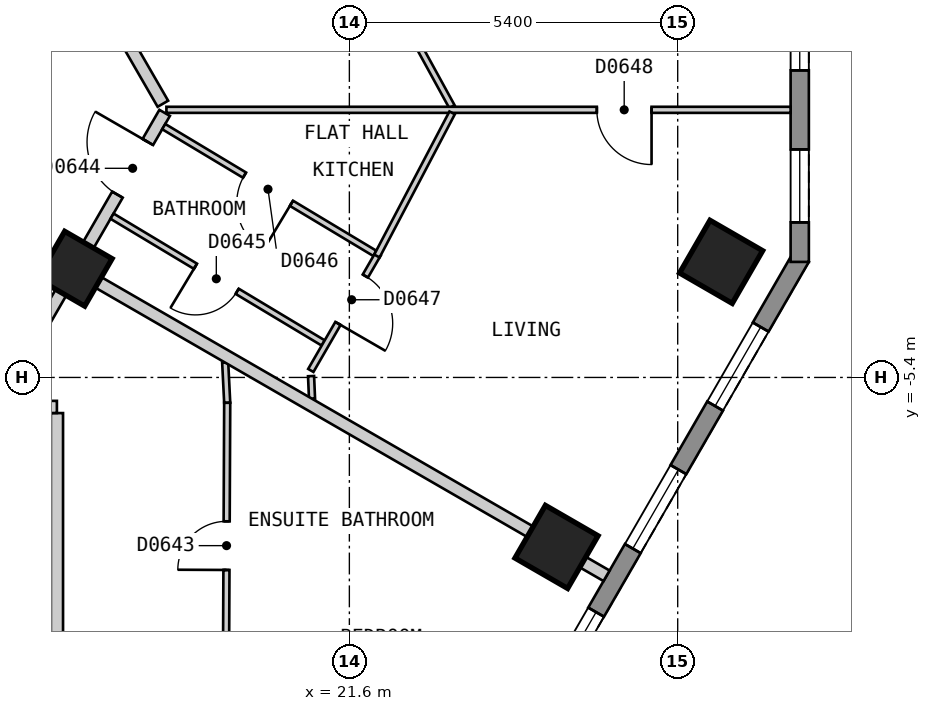
"""IFC4 building model, lengths in metres.
Left out: names, types, materials, properties, quantities, classifications, styles, units other than length and angle.
Written with IfcOpenShell. Run it as: python <this file> out.ifc"""

import sys

from ifc_helpers import new_model, si_unit, direction, frame, frame_2d, origin, origin_2d, place, context, subcontext, project, spatial, polyline, rectangle, outline, extrude, element, fill, save


model = new_model("IFC4")
c1 = context("Model", 3, precision=1e-05, world=origin(), true_north=direction((0.0, 1.0)))
c2 = subcontext(c1, "Body", "Model", "MODEL_VIEW")
j1 = project(units=[si_unit("LENGTHUNIT", "METRE"), si_unit("PLANEANGLEUNIT", "RADIAN")], contexts=[c1])
p1 = place(None, origin())
s1 = spatial("IfcSite", under=j1, at=p1, CompositionType="ELEMENT")
p2 = place(p1, origin())
s2 = spatial("IfcBuilding", under=s1, at=p2, CompositionType="ELEMENT")
p3 = place(p2, frame((0.0, 0.0, 81.0)))
s3 = spatial("IfcBuildingStorey", under=s2, at=p3, CompositionType="ELEMENT", Elevation=81.0)
for number, where, z_axis, x_axis in (
    (1, (25.007, -8.187, 0.0), (0.0, 0.0, 1.0), (0.5, 0.866, 0.0)),
    (2, (27.714, -3.499, 0.0), (0.0, 0.0, 1.0), (0.5, 0.866, 0.0)),
):
    element("IfcColumn", number, at=place(p3, frame(where, z_axis=z_axis, x_axis=x_axis)), inside=s3, PredefinedType="COLUMN", context=c2, shape_type="SweptSolid", body=[
        extrude(rectangle(XDim=1.0, YDim=1.0, at=origin_2d()), origin(), (0.0, 0.0, 1.0), 3.0),
    ])
p4 = place(p3, frame((17.083, -3.612, 0.0), z_axis=(0.0, 0.0, 1.0), x_axis=(0.5, 0.866025403784, 0.0)))
e3 = element("IfcColumn", 3, at=p4, inside=s3, PredefinedType="COLUMN", context=c2, shape_type="SweptSolid", body=[
    extrude(rectangle(XDim=0.9, YDim=0.9, at=origin_2d()), origin(), (0.0, 0.0, 1.0), 3.0),
])
p5 = place(p3, frame((17.479, -23.425, 0.0), z_axis=(0.0, 0.0, 1.0), x_axis=(0.500035407905, 0.866004960056, 0.0)))
e4 = element("IfcWall", 4, at=p5, inside=s3, PredefinedType="SOLIDWALL", context=c2, shape_type="SweptSolid", body=[
    extrude(outline(polyline([(0.0, -0.15), (23.094, -0.15), (23.014, 0.15), (0.08, 0.15), (0.0, -0.15)])), origin(), (0.0, 0.0, 1.0), 2.7),
])
p6 = place(p5, frame((1.324, 0.0, 0.15)))
e5 = element("IfcOpeningElement", 5, at=p6, cuts=e4, PredefinedType="OPENING", context=c2, shape_type="SweptSolid", body=[
    extrude(rectangle(XDim=1.5, YDim=2.1, at=frame_2d((0.75, 1.05))), frame((0.0, 0.16, 0.0), z_axis=(0.0, -1.0, 0.0), x_axis=(1.0, 0.0, 0.0)), (0.0, 0.0, 1.0), 0.32),
])
p7 = place(p5, frame((4.031, 0.0, 0.15)))
e6 = element("IfcOpeningElement", 6, at=p7, cuts=e4, PredefinedType="OPENING", context=c2, shape_type="SweptSolid", body=[
    extrude(rectangle(XDim=1.5, YDim=2.1, at=frame_2d((0.75, 1.05))), frame((0.0, 0.16, 0.0), z_axis=(0.0, -1.0, 0.0), x_axis=(1.0, 0.0, 0.0)), (0.0, 0.0, 1.0), 0.32),
])
p8 = place(p5, frame((6.737, 0.0, 0.15)))
e7 = element("IfcOpeningElement", 7, at=p8, cuts=e4, PredefinedType="OPENING", context=c2, shape_type="SweptSolid", body=[
    extrude(rectangle(XDim=1.5, YDim=2.1, at=frame_2d((0.75, 1.05))), frame((0.0, 0.16, 0.0), z_axis=(0.0, -1.0, 0.0), x_axis=(1.0, 0.0, 0.0)), (0.0, 0.0, 1.0), 0.32),
])
p9 = place(p5, frame((9.444, 0.0, 0.15)))
e8 = element("IfcOpeningElement", 8, at=p9, cuts=e4, PredefinedType="OPENING", context=c2, shape_type="SweptSolid", body=[
    extrude(rectangle(XDim=1.5, YDim=2.1, at=frame_2d((0.75, 1.05))), frame((0.0, 0.16, 0.0), z_axis=(0.0, -1.0, 0.0), x_axis=(1.0, 0.0, 0.0)), (0.0, 0.0, 1.0), 0.32),
])
p10 = place(p5, frame((12.151, 0.0, 0.15)))
e9 = element("IfcOpeningElement", 9, at=p10, cuts=e4, PredefinedType="OPENING", context=c2, shape_type="SweptSolid", body=[
    extrude(rectangle(XDim=1.5, YDim=2.1, at=frame_2d((0.75, 1.05))), frame((0.0, 0.16, 0.0), z_axis=(0.0, -1.0, 0.0), x_axis=(1.0, 0.0, 0.0)), (0.0, 0.0, 1.0), 0.32),
])
p11 = place(p5, frame((14.857, 0.0, 0.15)))
e10 = element("IfcOpeningElement", 10, at=p11, cuts=e4, PredefinedType="OPENING", context=c2, shape_type="SweptSolid", body=[
    extrude(rectangle(XDim=1.5, YDim=2.1, at=frame_2d((0.75, 1.05))), frame((0.0, 0.16, 0.0), z_axis=(0.0, -1.0, 0.0), x_axis=(1.0, 0.0, 0.0)), (0.0, 0.0, 1.0), 0.32),
])
p12 = place(p5, frame((17.564, 0.0, 0.15)))
e11 = element("IfcOpeningElement", 11, at=p12, cuts=e4, PredefinedType="OPENING", context=c2, shape_type="SweptSolid", body=[
    extrude(rectangle(XDim=1.5, YDim=2.1, at=frame_2d((0.75, 1.05))), frame((0.0, 0.16, 0.0), z_axis=(0.0, -1.0, 0.0), x_axis=(1.0, 0.0, 0.0)), (0.0, 0.0, 1.0), 0.32),
])
p13 = place(p5, frame((20.271, 0.0, 0.15)))
e12 = element("IfcOpeningElement", 12, at=p13, cuts=e4, PredefinedType="OPENING", context=c2, shape_type="SweptSolid", body=[
    extrude(rectangle(XDim=1.5, YDim=2.1, at=frame_2d((0.75, 1.05))), frame((0.0, 0.16, 0.0), z_axis=(0.0, -1.0, 0.0), x_axis=(1.0, 0.0, 0.0)), (0.0, 0.0, 1.0), 0.32),
])
p14 = place(p3, frame((29.007, -3.5, 0.0), z_axis=(0.0, 0.0, 1.0), x_axis=(0.0, 1.0, 0.0)))
e13 = element("IfcWall", 13, at=p14, inside=s3, PredefinedType="SOLIDWALL", context=c2, shape_type="SweptSolid", body=[
    extrude(outline(polyline([(0.0, -0.15), (5.0, -0.15), (4.92, 0.15), (0.08, 0.15), (0.0, -0.15)])), origin(), (0.0, 0.0, 1.0), 2.7),
])
p15 = place(p14, frame((0.65, 0.0, 0.15)))
e14 = element("IfcOpeningElement", 14, at=p15, cuts=e13, PredefinedType="OPENING", context=c2, shape_type="SweptSolid", body=[
    extrude(rectangle(XDim=1.2, YDim=2.1, at=frame_2d((0.6, 1.05))), frame((0.0, 0.16, 0.0), z_axis=(0.0, -1.0, 0.0), x_axis=(1.0, 0.0, 0.0)), (0.0, 0.0, 1.0), 0.32),
])
p16 = place(p14, frame((3.15, 0.0, 0.15)))
e15 = element("IfcOpeningElement", 15, at=p16, cuts=e13, PredefinedType="OPENING", context=c2, shape_type="SweptSolid", body=[
    extrude(rectangle(XDim=1.2, YDim=2.1, at=frame_2d((0.6, 1.05))), frame((0.0, 0.16, 0.0), z_axis=(0.0, -1.0, 0.0), x_axis=(1.0, 0.0, 0.0)), (0.0, 0.0, 1.0), 0.32),
])
p17 = place(p3, frame((8.488, 16.5, 0.0), z_axis=(0.0, 0.0, 1.0), x_axis=(0.499986836607, -0.86603300354, 0.0)))
e16 = element("IfcWall", 16, at=p17, inside=s3, PredefinedType="PARTITIONING", context=c2, shape_type="SweptSolid", body=[
    extrude(rectangle(XDim=20.09, YDim=0.2, at=frame_2d((10.045, 0.0))), origin(), (0.0, 0.0, 1.0), 2.7),
])
p18 = place(p17, frame((14.569, 0.0, 0.0)))
e17 = element("IfcOpeningElement", 17, at=p18, cuts=e16, PredefinedType="OPENING", context=c2, shape_type="SweptSolid", body=[
    extrude(rectangle(XDim=1.0, YDim=2.1, at=frame_2d((0.5, 1.05))), frame((0.0, 0.11, 0.0), z_axis=(0.0, -1.0, 0.0), x_axis=(1.0, 0.0, 0.0)), (0.0, 0.0, 1.0), 0.22),
])
p19 = place(p3, frame((16.791, -5.986, 0.0), z_axis=(0.0, 0.0, 1.0), x_axis=(0.0, -1.0, 0.0)))
e18 = element("IfcWall", 18, at=p19, inside=s3, PredefinedType="PARTITIONING", context=c2, shape_type="SweptSolid", body=[
    extrude(rectangle(XDim=3.708, YDim=0.2, at=frame_2d((1.854, 0.0))), origin(), (0.0, 0.0, 1.0), 2.7),
])
p20 = place(p3, frame((15.887, -5.885, 0.0), z_axis=(0.0, 0.0, 1.0), x_axis=(1.0, 0.0, 0.0)))
e19 = element("IfcWall", 19, at=p20, inside=s3, PredefinedType="PARTITIONING", context=c2, shape_type="SweptSolid", body=[
    extrude(rectangle(XDim=0.903, YDim=0.2, at=frame_2d((0.452, 0.0))), origin(), (0.0, 0.0, 1.0), 2.7),
])
p21 = place(p3, frame((15.771, -5.884, 0.0), z_axis=(0.0, 0.0, 1.0), x_axis=(0.499939494019, 0.866060334111, 0.0)))
e20 = element("IfcWall", 20, at=p21, inside=s3, PredefinedType="PARTITIONING", context=c2, shape_type="SweptSolid", body=[
    extrude(rectangle(XDim=5.583, YDim=0.2, at=frame_2d((2.792, 0.0))), origin(), (0.0, 0.0, 1.0), 2.7),
])
p22 = place(p21, frame((4.03, 0.0, 0.0)))
e21 = element("IfcOpeningElement", 21, at=p22, cuts=e20, PredefinedType="OPENING", context=c2, shape_type="SweptSolid", body=[
    extrude(rectangle(XDim=1.0, YDim=2.1, at=frame_2d((0.5, 1.05))), frame((0.0, 0.11, 0.0), z_axis=(0.0, -1.0, 0.0), x_axis=(1.0, 0.0, 0.0)), (0.0, 0.0, 1.0), 0.22),
])
p23 = place(p3, frame((20.964, 3.287, 0.0), z_axis=(0.0, 0.0, 1.0), x_axis=(0.4810005962, -0.876720266936, 0.0)))
e22 = element("IfcWall", 22, at=p23, inside=s3, PredefinedType="PARTITIONING", context=c2, shape_type="SweptSolid", body=[
    extrude(rectangle(XDim=4.83, YDim=0.1, at=frame_2d((2.415, 0.0))), origin(), (0.0, 0.0, 1.0), 2.7),
])
p24 = place(p23, frame((1.995, 0.0, 0.0)))
e23 = element("IfcOpeningElement", 23, at=p24, cuts=e22, PredefinedType="OPENING", context=c2, shape_type="SweptSolid", body=[
    extrude(rectangle(XDim=0.8, YDim=2.1, at=frame_2d((0.4, 1.05))), frame((0.0, 0.06, 0.0), z_axis=(0.0, -1.0, 0.0), x_axis=(1.0, 0.0, 0.0)), (0.0, 0.0, 1.0), 0.12),
])
p25 = place(p3, frame((19.558, -5.156, 0.0), z_axis=(0.0, 0.0, 1.0), x_axis=(0.04980880462, -0.998758771167, 0.0)))
e24 = element("IfcWall", 24, at=p25, inside=s3, PredefinedType="PARTITIONING", context=c2, shape_type="SweptSolid", body=[
    extrude(rectangle(XDim=0.662, YDim=0.1, at=frame_2d((0.331, 0.0))), origin(), (0.0, 0.0, 1.0), 2.7),
])
p26 = place(p3, frame((20.97, -5.378, 0.0), z_axis=(0.0, 0.0, 1.0), x_axis=(0.043266532348, -0.999063565134, 0.0)))
e25 = element("IfcWall", 25, at=p26, inside=s3, PredefinedType="PARTITIONING", context=c2, shape_type="SweptSolid", body=[
    extrude(rectangle(XDim=0.372, YDim=0.1, at=frame_2d((0.186, 0.0))), origin(), (0.0, 0.0, 1.0), 2.7),
])
p27 = place(p3, frame((17.697, -2.748, 0.0), z_axis=(0.0, 0.0, 1.0), x_axis=(0.857359945576, -0.514717324093, 0.0)))
e26 = element("IfcWall", 26, at=p27, inside=s3, PredefinedType="PARTITIONING", context=c2, shape_type="SweptSolid", body=[
    extrude(rectangle(XDim=4.051, YDim=0.1, at=frame_2d((2.025, 0.0))), origin(), (0.0, 0.0, 1.0), 2.7),
])
p28 = place(p27, frame((1.6, 0.0, 0.0)))
e27 = element("IfcOpeningElement", 27, at=p28, cuts=e26, PredefinedType="OPENING", context=c2, shape_type="SweptSolid", body=[
    extrude(rectangle(XDim=0.8, YDim=2.1, at=frame_2d((0.4, 1.05))), frame((0.0, 0.06, 0.0), z_axis=(0.0, -1.0, 0.0), x_axis=(1.0, 0.0, 0.0)), (0.0, 0.0, 1.0), 0.12),
])
p29 = place(p3, frame((18.547, -1.275, 0.0), z_axis=(0.0, 0.0, 1.0), x_axis=(0.85733334763, -0.514761625456, 0.0)))
e28 = element("IfcWall", 28, at=p29, inside=s3, PredefinedType="PARTITIONING", context=c2, shape_type="SweptSolid", body=[
    extrude(rectangle(XDim=4.051, YDim=0.1, at=frame_2d((2.025, 0.0))), origin(), (0.0, 0.0, 1.0), 2.7),
])
p30 = place(p29, frame((1.55, 0.0, 0.0)))
e29 = element("IfcOpeningElement", 29, at=p30, cuts=e28, PredefinedType="OPENING", context=c2, shape_type="SweptSolid", body=[
    extrude(rectangle(XDim=0.9, YDim=2.1, at=frame_2d((0.45, 1.05))), frame((0.0, 0.06, 0.0), z_axis=(0.0, -1.0, 0.0), x_axis=(1.0, 0.0, 0.0)), (0.0, 0.0, 1.0), 0.12),
])
p31 = place(p3, frame((18.591, -0.999, 0.0), z_axis=(0.0, 0.0, 1.0), x_axis=(1.0, 0.0, 0.0)))
e30 = element("IfcWall", 30, at=p31, inside=s3, PredefinedType="PARTITIONING", context=c2, shape_type="SweptSolid", body=[
    extrude(rectangle(XDim=10.266, YDim=0.1, at=frame_2d((5.133, 0.0))), origin(), (0.0, 0.0, 1.0), 2.7),
])
p32 = place(p31, frame((7.079, 0.0, 0.0)))
e31 = element("IfcOpeningElement", 31, at=p32, cuts=e30, PredefinedType="OPENING", context=c2, shape_type="SweptSolid", body=[
    extrude(rectangle(XDim=0.9, YDim=2.1, at=frame_2d((0.45, 1.05))), frame((0.0, 0.06, 0.0), z_axis=(0.0, -1.0, 0.0), x_axis=(1.0, 0.0, 0.0)), (0.0, 0.0, 1.0), 0.12),
])
p33 = place(p3, frame((20.966, -5.285, 0.0), z_axis=(0.0, 0.0, 1.0), x_axis=(0.500244510215, 0.865884189716, 0.0)))
e32 = element("IfcWall", 32, at=p33, inside=s3, PredefinedType="PARTITIONING", context=c2, shape_type="SweptSolid", body=[
    extrude(rectangle(XDim=2.213, YDim=0.1, at=frame_2d((1.106, 0.0))), origin(), (0.0, 0.0, 1.0), 2.7),
])
p34 = place(p33, frame((0.893, 0.0, 0.0)))
e33 = element("IfcOpeningElement", 33, at=p34, cuts=e32, PredefinedType="OPENING", context=c2, shape_type="SweptSolid", body=[
    extrude(rectangle(XDim=0.9, YDim=2.1, at=frame_2d((0.45, 1.05))), frame((0.0, 0.06, 0.0), z_axis=(0.0, -1.0, 0.0), x_axis=(1.0, 0.0, 0.0)), (0.0, 0.0, 1.0), 0.12),
])
p35 = place(p3, frame((22.053, -3.403, 0.0), z_axis=(0.0, 0.0, 1.0), x_axis=(0.465190117005, 0.885210796952, 0.0)))
e34 = element("IfcWall", 34, at=p35, inside=s3, PredefinedType="PARTITIONING", context=c2, shape_type="SweptSolid", body=[
    extrude(rectangle(XDim=2.659, YDim=0.1, at=frame_2d((1.33, 0.0))), origin(), (0.0, 0.0, 1.0), 2.7),
])
p36 = place(p3, frame((19.566, -11.238, 0.0), z_axis=(0.0, 0.0, 1.0), x_axis=(0.004638545009, 0.999989241892, 0.0)))
e35 = element("IfcWall", 35, at=p36, inside=s3, PredefinedType="PARTITIONING", context=c2, shape_type="SweptSolid", body=[
    extrude(rectangle(XDim=5.421, YDim=0.1, at=frame_2d((2.71, 0.0))), origin(), (0.0, 0.0, 1.0), 2.7),
])
p37 = place(p36, frame((2.672, 0.0, 0.0)))
e36 = element("IfcOpeningElement", 36, at=p37, cuts=e35, PredefinedType="OPENING", context=c2, shape_type="SweptSolid", body=[
    extrude(rectangle(XDim=0.8, YDim=2.1, at=frame_2d((0.4, 1.05))), frame((0.0, 0.06, 0.0), z_axis=(0.0, -1.0, 0.0), x_axis=(1.0, 0.0, 0.0)), (0.0, 0.0, 1.0), 0.12),
])
p38 = place(p3, frame((17.169, -3.662, 0.0), z_axis=(0.0, 0.0, 1.0), x_axis=(0.866047370643, -0.499961950354, 0.0)))
e37 = element("IfcWall", 37, at=p38, inside=s3, PredefinedType="PARTITIONING", context=c2, shape_type="SweptSolid", body=[
    extrude(rectangle(XDim=10.001, YDim=0.2, at=frame_2d((5.0, 0.0))), origin(), (0.0, 0.0, 1.0), 2.7),
])
p39 = place(p11, origin())
e38 = element("IfcWindow", 38, at=p39, inside=s3, PartitioningType="SINGLE_PANEL", PredefinedType="WINDOW", context=c2, shape_type="SweptSolid", body=[
    extrude(rectangle(XDim=1.5, YDim=2.1, at=frame_2d((0.75, 1.05))), frame((0.0, 0.03, 0.0), z_axis=(0.0, -1.0, 0.0), x_axis=(1.0, 0.0, 0.0)), (0.0, 0.0, 1.0), 0.06),
])
fill(e10, e38)
p40 = place(p12, origin())
e39 = element("IfcWindow", 39, at=p40, inside=s3, PartitioningType="SINGLE_PANEL", PredefinedType="WINDOW", context=c2, shape_type="SweptSolid", body=[
    extrude(rectangle(XDim=1.5, YDim=2.1, at=frame_2d((0.75, 1.05))), frame((0.0, 0.03, 0.0), z_axis=(0.0, -1.0, 0.0), x_axis=(1.0, 0.0, 0.0)), (0.0, 0.0, 1.0), 0.06),
])
fill(e11, e39)
p41 = place(p13, origin())
e40 = element("IfcWindow", 40, at=p41, inside=s3, PartitioningType="SINGLE_PANEL", PredefinedType="WINDOW", context=c2, shape_type="SweptSolid", body=[
    extrude(rectangle(XDim=1.5, YDim=2.1, at=frame_2d((0.75, 1.05))), frame((0.0, 0.03, 0.0), z_axis=(0.0, -1.0, 0.0), x_axis=(1.0, 0.0, 0.0)), (0.0, 0.0, 1.0), 0.06),
])
fill(e12, e40)
p42 = place(p15, origin())
e41 = element("IfcWindow", 41, at=p42, inside=s3, PartitioningType="SINGLE_PANEL", PredefinedType="WINDOW", context=c2, shape_type="SweptSolid", body=[
    extrude(rectangle(XDim=1.2, YDim=2.1, at=frame_2d((0.6, 1.05))), frame((0.0, 0.03, 0.0), z_axis=(0.0, -1.0, 0.0), x_axis=(1.0, 0.0, 0.0)), (0.0, 0.0, 1.0), 0.06),
])
fill(e14, e41)
p43 = place(p16, origin())
e42 = element("IfcWindow", 42, at=p43, inside=s3, PartitioningType="SINGLE_PANEL", PredefinedType="WINDOW", context=c2, shape_type="SweptSolid", body=[
    extrude(rectangle(XDim=1.2, YDim=2.1, at=frame_2d((0.6, 1.05))), frame((0.0, 0.03, 0.0), z_axis=(0.0, -1.0, 0.0), x_axis=(1.0, 0.0, 0.0)), (0.0, 0.0, 1.0), 0.06),
])
fill(e15, e42)
p44 = place(p37, origin())
e43 = element("IfcDoor", 43, at=p44, inside=s3, OperationType="SINGLE_SWING_LEFT", PredefinedType="DOOR", context=c2, shape_type="SweptSolid", body=[
    extrude(rectangle(XDim=0.8, YDim=2.1, at=frame_2d((0.4, 1.05))), frame((0.0, 0.025, 0.0), z_axis=(0.0, -1.0, 0.0), x_axis=(1.0, 0.0, 0.0)), (0.0, 0.0, 1.0), 0.05),
])
fill(e36, e43)
p45 = place(p22, origin())
e44 = element("IfcDoor", 44, at=p45, inside=s3, OperationType="SINGLE_SWING_RIGHT", PredefinedType="DOOR", context=c2, shape_type="SweptSolid", body=[
    extrude(rectangle(XDim=1.0, YDim=2.1, at=frame_2d((0.5, 1.05))), frame((0.0, 0.025, 0.0), z_axis=(0.0, -1.0, 0.0), x_axis=(1.0, 0.0, 0.0)), (0.0, 0.0, 1.0), 0.05),
])
fill(e21, e44)
p46 = place(p28, origin())
e45 = element("IfcDoor", 45, at=p46, inside=s3, OperationType="SINGLE_SWING_LEFT", PredefinedType="DOOR", context=c2, shape_type="SweptSolid", body=[
    extrude(rectangle(XDim=0.8, YDim=2.1, at=frame_2d((0.4, 1.05))), frame((0.0, 0.025, 0.0), z_axis=(0.0, -1.0, 0.0), x_axis=(1.0, 0.0, 0.0)), (0.0, 0.0, 1.0), 0.05),
])
fill(e27, e45)
p47 = place(p30, origin())
e46 = element("IfcDoor", 46, at=p47, inside=s3, OperationType="SINGLE_SWING_RIGHT", PredefinedType="DOOR", context=c2, shape_type="SweptSolid", body=[
    extrude(rectangle(XDim=0.9, YDim=2.1, at=frame_2d((0.45, 1.05))), frame((0.0, 0.025, 0.0), z_axis=(0.0, -1.0, 0.0), x_axis=(1.0, 0.0, 0.0)), (0.0, 0.0, 1.0), 0.05),
])
fill(e29, e46)
p48 = place(p34, origin())
e47 = element("IfcDoor", 47, at=p48, inside=s3, OperationType="SINGLE_SWING_LEFT", PredefinedType="DOOR", context=c2, shape_type="SweptSolid", body=[
    extrude(rectangle(XDim=0.9, YDim=2.1, at=frame_2d((0.45, 1.05))), frame((0.0, 0.025, 0.0), z_axis=(0.0, -1.0, 0.0), x_axis=(1.0, 0.0, 0.0)), (0.0, 0.0, 1.0), 0.05),
])
fill(e33, e47)
p49 = place(p32, origin())
e48 = element("IfcDoor", 48, at=p49, inside=s3, OperationType="SINGLE_SWING_RIGHT", PredefinedType="DOOR", context=c2, shape_type="SweptSolid", body=[
    extrude(rectangle(XDim=0.9, YDim=2.1, at=frame_2d((0.45, 1.05))), frame((0.0, 0.025, 0.0), z_axis=(0.0, -1.0, 0.0), x_axis=(1.0, 0.0, 0.0)), (0.0, 0.0, 1.0), 0.05),
])
fill(e31, e48)
save(model, sys.argv[1])
